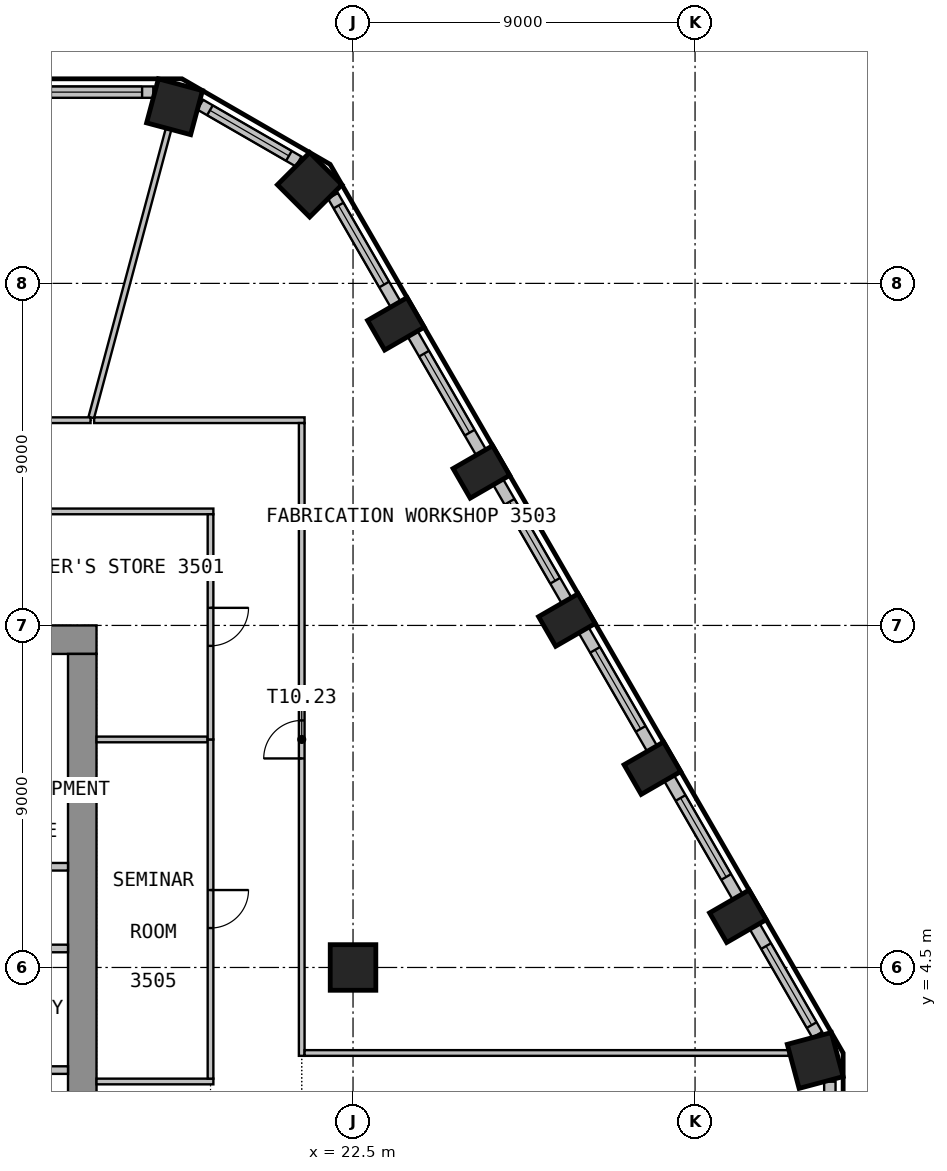
"""IFC4 building model, lengths in metres.
Left out: names, types, materials, properties, quantities, classifications, styles, units other than length and angle.
Written with IfcOpenShell. Run it as: python <this file> out.ifc"""

import sys

from ifc_helpers import new_model, si_unit, direction, frame, frame_2d, origin, origin_2d, place, context, subcontext, project, spatial, rectangle, circle, extrude, element, fill, save


model = new_model("IFC4")
c1 = context("Model", 3, precision=1e-05, world=origin(), true_north=direction((0.0, 1.0)))
c2 = subcontext(c1, "Body", "Model", "MODEL_VIEW")
j1 = project(units=[si_unit("LENGTHUNIT", "METRE"), si_unit("PLANEANGLEUNIT", "RADIAN")], contexts=[c1])
p1 = place(None, origin())
s1 = spatial("IfcSite", under=j1, at=p1, CompositionType="ELEMENT")
p2 = place(p1, origin())
s2 = spatial("IfcBuilding", under=s1, at=p2, CompositionType="ELEMENT")
p3 = place(p2, frame((0.0, 0.0, 144.3)))
s3 = spatial("IfcBuildingStorey", under=s2, at=p3, CompositionType="ELEMENT", Elevation=144.3)
p4 = place(p3, frame((34.662, 2.053, 0.0), z_axis=(0.0, 0.0, 1.0), x_axis=(-0.258819045103, 0.965925826289, 0.0)))
e1 = element("IfcColumn", 1, at=p4, inside=s3, PredefinedType="COLUMN", context=c2, shape_type="SweptSolid", body=[
    extrude(rectangle(XDim=1.2, YDim=1.2, at=origin_2d()), origin(), (0.0, 0.0, 1.0), 3.575),
])
for number, where, z_axis, x_axis in (
    (2, (32.627, 5.847, 0.0), (0.0, 0.0, 1.0), (-0.5, 0.866, 0.0)),
    (3, (30.377, 9.744, 0.0), (0.0, 0.0, 1.0), (-0.5, 0.866, 0.0)),
    (4, (28.127, 13.641, 0.0), (0.0, 0.0, 1.0), (-0.5, 0.866, 0.0)),
    (5, (25.877, 17.539, 0.0), (0.0, 0.0, 1.0), (-0.5, 0.866, 0.0)),
    (6, (23.627, 21.436, 0.0), (0.0, 0.0, 1.0), (-0.5, 0.866, 0.0)),
):
    element("IfcColumn", number, at=place(p3, frame(where, z_axis=z_axis, x_axis=x_axis)), inside=s3, PredefinedType="COLUMN", context=c2, shape_type="SweptSolid", body=[
        extrude(rectangle(XDim=0.9, YDim=1.2, at=origin_2d()), origin(), (0.0, 0.0, 1.0), 3.575),
    ])
for number, where, z_axis, x_axis in (
    (7, (21.359, 25.095, 0.0), (0.0, 0.0, 1.0), (-0.707, 0.707, 0.0)),
    (8, (17.803, 27.148, 0.0), (0.0, 0.0, 1.0), (-0.966, 0.259, 0.0)),
):
    element("IfcColumn", number, at=place(p3, frame(where, z_axis=z_axis, x_axis=x_axis)), inside=s3, PredefinedType="COLUMN", context=c2, shape_type="SweptSolid", body=[
        extrude(rectangle(XDim=1.2, YDim=1.2, at=origin_2d()), origin(), (0.0, 0.0, 1.0), 3.575),
    ])
p5 = place(p3, frame((22.5, 4.5, 0.0), z_axis=(0.0, 0.0, 1.0), x_axis=(1.0, 0.0, 0.0)))
e9 = element("IfcColumn", 9, at=p5, inside=s3, PredefinedType="COLUMN", context=c2, shape_type="SweptSolid", body=[
    extrude(circle(Radius=0.6, at=origin_2d()), origin(), (0.0, 0.0, 1.0), 3.575),
])
p6 = place(p3, frame((35.047, -1.495, 0.0), z_axis=(0.0, 0.0, 1.0), x_axis=(0.0, 1.0, 0.0)))
e10 = element("IfcWall", 10, at=p6, inside=s3, PredefinedType="SOLIDWALL", context=c2, shape_type="SweptSolid", body=[
    extrude(rectangle(XDim=2.989, YDim=0.3, at=frame_2d((1.495, 0.0))), origin(), (0.0, 0.0, 1.0), 3.575),
])
p7 = place(p6, frame((0.295, 0.0, 0.9)))
e11 = element("IfcOpeningElement", 11, at=p7, cuts=e10, PredefinedType="OPENING", context=c2, shape_type="SweptSolid", body=[
    extrude(rectangle(XDim=2.4, YDim=2.1, at=frame_2d((1.2, 1.05))), frame((0.0, 0.16, 0.0), z_axis=(0.0, -1.0, 0.0), x_axis=(1.0, 0.0, 0.0)), (0.0, 0.0, 1.0), 0.32),
])
p8 = place(p3, frame((34.716, 2.729, 0.0), z_axis=(0.0, 0.0, 1.0), x_axis=(-0.499981217486, 0.866036247602, 0.0)))
e12 = element("IfcWall", 12, at=p8, inside=s3, PredefinedType="SOLIDWALL", context=c2, shape_type="SweptSolid", body=[
    extrude(rectangle(XDim=3.294, YDim=0.3, at=frame_2d((1.647, 0.0))), origin(), (0.0, 0.0, 1.0), 3.575),
])
p9 = place(p8, frame((0.295, 0.0, 0.9)))
e13 = element("IfcOpeningElement", 13, at=p9, cuts=e12, PredefinedType="OPENING", context=c2, shape_type="SweptSolid", body=[
    extrude(rectangle(XDim=2.4, YDim=2.1, at=frame_2d((1.2, 1.05))), frame((0.0, 0.16, 0.0), z_axis=(0.0, -1.0, 0.0), x_axis=(1.0, 0.0, 0.0)), (0.0, 0.0, 1.0), 0.32),
])
p10 = place(p3, frame((32.619, 6.362, 0.0), z_axis=(0.0, 0.0, 1.0), x_axis=(-0.500027802648, 0.866009351323, 0.0)))
e14 = element("IfcWall", 14, at=p10, inside=s3, PredefinedType="SOLIDWALL", context=c2, shape_type="SweptSolid", body=[
    extrude(rectangle(XDim=3.599, YDim=0.3, at=frame_2d((1.799, 0.0))), origin(), (0.0, 0.0, 1.0), 3.575),
])
p11 = place(p10, frame((0.6, 0.0, 0.9)))
e15 = element("IfcOpeningElement", 15, at=p11, cuts=e14, PredefinedType="OPENING", context=c2, shape_type="SweptSolid", body=[
    extrude(rectangle(XDim=2.4, YDim=2.1, at=frame_2d((1.2, 1.05))), frame((0.0, 0.16, 0.0), z_axis=(0.0, -1.0, 0.0), x_axis=(1.0, 0.0, 0.0)), (0.0, 0.0, 1.0), 0.32),
])
p12 = place(p3, frame((30.369, 10.26, 0.0), z_axis=(0.0, 0.0, 1.0), x_axis=(-0.500027802648, 0.866009351323, 0.0)))
e16 = element("IfcWall", 16, at=p12, inside=s3, PredefinedType="SOLIDWALL", context=c2, shape_type="SweptSolid", body=[
    extrude(rectangle(XDim=3.599, YDim=0.3, at=frame_2d((1.799, 0.0))), origin(), (0.0, 0.0, 1.0), 3.575),
])
p13 = place(p12, frame((0.6, 0.0, 0.9)))
e17 = element("IfcOpeningElement", 17, at=p13, cuts=e16, PredefinedType="OPENING", context=c2, shape_type="SweptSolid", body=[
    extrude(rectangle(XDim=2.4, YDim=2.1, at=frame_2d((1.2, 1.05))), frame((0.0, 0.16, 0.0), z_axis=(0.0, -1.0, 0.0), x_axis=(1.0, 0.0, 0.0)), (0.0, 0.0, 1.0), 0.32),
])
p14 = place(p3, frame((28.119, 14.156, 0.0), z_axis=(0.0, 0.0, 1.0), x_axis=(-0.500027802648, 0.866009351323, 0.0)))
e18 = element("IfcWall", 18, at=p14, inside=s3, PredefinedType="SOLIDWALL", context=c2, shape_type="SweptSolid", body=[
    extrude(rectangle(XDim=3.599, YDim=0.3, at=frame_2d((1.799, 0.0))), origin(), (0.0, 0.0, 1.0), 3.575),
])
p15 = place(p14, frame((0.6, 0.0, 0.9)))
e19 = element("IfcOpeningElement", 19, at=p15, cuts=e18, PredefinedType="OPENING", context=c2, shape_type="SweptSolid", body=[
    extrude(rectangle(XDim=2.4, YDim=2.1, at=frame_2d((1.2, 1.05))), frame((0.0, 0.16, 0.0), z_axis=(0.0, -1.0, 0.0), x_axis=(1.0, 0.0, 0.0)), (0.0, 0.0, 1.0), 0.32),
])
p16 = place(p3, frame((25.869, 18.054, 0.0), z_axis=(0.0, 0.0, 1.0), x_axis=(-0.500027802648, 0.866009351323, 0.0)))
e20 = element("IfcWall", 20, at=p16, inside=s3, PredefinedType="SOLIDWALL", context=c2, shape_type="SweptSolid", body=[
    extrude(rectangle(XDim=3.599, YDim=0.3, at=frame_2d((1.799, 0.0))), origin(), (0.0, 0.0, 1.0), 3.575),
])
p17 = place(p16, frame((0.6, 0.0, 0.9)))
e21 = element("IfcOpeningElement", 21, at=p17, cuts=e20, PredefinedType="OPENING", context=c2, shape_type="SweptSolid", body=[
    extrude(rectangle(XDim=2.4, YDim=2.1, at=frame_2d((1.2, 1.05))), frame((0.0, 0.16, 0.0), z_axis=(0.0, -1.0, 0.0), x_axis=(1.0, 0.0, 0.0)), (0.0, 0.0, 1.0), 0.32),
])
p18 = place(p3, frame((23.619, 21.951, 0.0), z_axis=(0.0, 0.0, 1.0), x_axis=(-0.500036802197, 0.866004154983, 0.0)))
e22 = element("IfcWall", 22, at=p18, inside=s3, PredefinedType="SOLIDWALL", context=c2, shape_type="SweptSolid", body=[
    extrude(rectangle(XDim=3.294, YDim=0.3, at=frame_2d((1.647, 0.0))), origin(), (0.0, 0.0, 1.0), 3.575),
])
p19 = place(p18, frame((0.6, 0.0, 0.9)))
e23 = element("IfcOpeningElement", 23, at=p19, cuts=e22, PredefinedType="OPENING", context=c2, shape_type="SweptSolid", body=[
    extrude(rectangle(XDim=2.4, YDim=2.1, at=frame_2d((1.2, 1.05))), frame((0.0, 0.16, 0.0), z_axis=(0.0, -1.0, 0.0), x_axis=(1.0, 0.0, 0.0)), (0.0, 0.0, 1.0), 0.32),
])
p20 = place(p3, frame((21.068, 25.707, 0.0), z_axis=(0.0, 0.0, 1.0), x_axis=(-0.866012844897, 0.500021752, 0.0)))
e24 = element("IfcWall", 24, at=p20, inside=s3, PredefinedType="SOLIDWALL", context=c2, shape_type="SweptSolid", body=[
    extrude(rectangle(XDim=2.989, YDim=0.3, at=frame_2d((1.495, 0.0))), origin(), (0.0, 0.0, 1.0), 3.575),
])
p21 = place(p20, frame((0.295, 0.0, 0.9)))
e25 = element("IfcOpeningElement", 25, at=p21, cuts=e24, PredefinedType="OPENING", context=c2, shape_type="SweptSolid", body=[
    extrude(rectangle(XDim=2.4, YDim=2.1, at=frame_2d((1.2, 1.05))), frame((0.0, 0.16, 0.0), z_axis=(0.0, -1.0, 0.0), x_axis=(1.0, 0.0, 0.0)), (0.0, 0.0, 1.0), 0.32),
])
p22 = place(p3, frame((17.245, 27.533, 0.0), z_axis=(0.0, 0.0, 1.0), x_axis=(-1.0, 0.0, 0.0)))
e26 = element("IfcWall", 26, at=p22, inside=s3, PredefinedType="SOLIDWALL", context=c2, shape_type="SweptSolid", body=[
    extrude(rectangle(XDim=3.294, YDim=0.3, at=frame_2d((1.647, 0.0))), origin(), (0.0, 0.0, 1.0), 3.575),
])
p23 = place(p22, frame((0.295, 0.0, 0.9)))
e27 = element("IfcOpeningElement", 27, at=p23, cuts=e26, PredefinedType="OPENING", context=c2, shape_type="SweptSolid", body=[
    extrude(rectangle(XDim=2.4, YDim=2.1, at=frame_2d((1.2, 1.05))), frame((0.0, 0.16, 0.0), z_axis=(0.0, -1.0, 0.0), x_axis=(1.0, 0.0, 0.0)), (0.0, 0.0, 1.0), 0.32),
])
p24 = place(p3, frame((-15.75, 13.125, 0.0), z_axis=(0.0, 0.0, 1.0), x_axis=(1.0, 0.0, 0.0)))
e28 = element("IfcWall", 28, at=p24, inside=s3, PredefinedType="SHEAR", context=c2, shape_type="SweptSolid", body=[
    extrude(rectangle(XDim=31.5, YDim=0.75, at=frame_2d((15.75, 0.0))), origin(), (0.0, 0.0, 1.0), 3.575),
])
p25 = place(p24, frame((14.55, 0.0, 0.0)))
e29 = element("IfcOpeningElement", 29, at=p25, cuts=e28, PredefinedType="OPENING", context=c2, shape_type="SweptSolid", body=[
    extrude(rectangle(XDim=2.4, YDim=2.1, at=frame_2d((1.2, 1.05))), frame((0.0, 0.385, 0.0), z_axis=(0.0, -1.0, 0.0), x_axis=(1.0, 0.0, 0.0)), (0.0, 0.0, 1.0), 0.77),
])
p26 = place(p24, frame((3.3, 0.0, 0.0)))
e30 = element("IfcOpeningElement", 30, at=p26, cuts=e28, PredefinedType="OPENING", context=c2, shape_type="SweptSolid", body=[
    extrude(rectangle(XDim=1.2, YDim=2.1, at=frame_2d((0.6, 1.05))), frame((0.0, 0.385, 0.0), z_axis=(0.0, -1.0, 0.0), x_axis=(1.0, 0.0, 0.0)), (0.0, 0.0, 1.0), 0.77),
])
p27 = place(p24, frame((27.0, 0.0, 0.0)))
e31 = element("IfcOpeningElement", 31, at=p27, cuts=e28, PredefinedType="OPENING", context=c2, shape_type="SweptSolid", body=[
    extrude(rectangle(XDim=1.2, YDim=2.1, at=frame_2d((0.6, 1.05))), frame((0.0, 0.385, 0.0), z_axis=(0.0, -1.0, 0.0), x_axis=(1.0, 0.0, 0.0)), (0.0, 0.0, 1.0), 0.77),
])
p28 = place(p3, frame((15.375, -12.75, 0.0), z_axis=(0.0, 0.0, 1.0), x_axis=(0.0, 1.0, 0.0)))
e32 = element("IfcWall", 32, at=p28, inside=s3, PredefinedType="SHEAR", context=c2, shape_type="SweptSolid", body=[
    extrude(rectangle(XDim=25.5, YDim=0.75, at=frame_2d((12.75, 0.0))), origin(), (0.0, 0.0, 1.0), 3.575),
])
p29 = place(p28, frame((11.55, 0.0, 0.0)))
e33 = element("IfcOpeningElement", 33, at=p29, cuts=e32, PredefinedType="OPENING", context=c2, shape_type="SweptSolid", body=[
    extrude(rectangle(XDim=2.4, YDim=2.1, at=frame_2d((1.2, 1.05))), frame((0.0, 0.385, 0.0), z_axis=(0.0, -1.0, 0.0), x_axis=(1.0, 0.0, 0.0)), (0.0, 0.0, 1.0), 0.77),
])
p30 = place(p3, frame((12.9, 7.15, 0.0), z_axis=(0.0, 0.0, 1.0), x_axis=(1.0, 0.0, 0.0)))
e34 = element("IfcWall", 34, at=p30, inside=s3, PredefinedType="PARTITIONING", context=c2, shape_type="SweptSolid", body=[
    extrude(rectangle(XDim=2.1, YDim=0.2, at=frame_2d((1.05, 0.0))), origin(), (0.0, 0.0, 1.0), 3.575),
])
p31 = place(p30, frame((0.6, 0.0, 0.0)))
e35 = element("IfcOpeningElement", 35, at=p31, cuts=e34, PredefinedType="OPENING", context=c2, shape_type="SweptSolid", body=[
    extrude(rectangle(XDim=0.9, YDim=2.1, at=frame_2d((0.45, 1.05))), frame((0.0, 0.11, 0.0), z_axis=(0.0, -1.0, 0.0), x_axis=(1.0, 0.0, 0.0)), (0.0, 0.0, 1.0), 0.22),
])
p32 = place(p3, frame((12.9, 5.0, 0.0), z_axis=(0.0, 0.0, 1.0), x_axis=(1.0, 0.0, 0.0)))
e36 = element("IfcWall", 36, at=p32, inside=s3, PredefinedType="PARTITIONING", context=c2, shape_type="SweptSolid", body=[
    extrude(rectangle(XDim=2.1, YDim=0.2, at=frame_2d((1.05, 0.0))), origin(), (0.0, 0.0, 1.0), 3.575),
])
p33 = place(p32, frame((0.6, 0.0, 0.0)))
e37 = element("IfcOpeningElement", 37, at=p33, cuts=e36, PredefinedType="OPENING", context=c2, shape_type="SweptSolid", body=[
    extrude(rectangle(XDim=0.9, YDim=2.1, at=frame_2d((0.45, 1.05))), frame((0.0, 0.11, 0.0), z_axis=(0.0, -1.0, 0.0), x_axis=(1.0, 0.0, 0.0)), (0.0, 0.0, 1.0), 0.22),
])
p34 = place(p3, frame((12.9, 1.8, 0.0), z_axis=(0.0, 0.0, 1.0), x_axis=(1.0, 0.0, 0.0)))
e38 = element("IfcWall", 38, at=p34, inside=s3, PredefinedType="PARTITIONING", context=c2, shape_type="SweptSolid", body=[
    extrude(rectangle(XDim=2.1, YDim=0.2, at=frame_2d((1.05, 0.0))), origin(), (0.0, 0.0, 1.0), 3.575),
])
p35 = place(p3, frame((15.593, 18.9, 0.0), z_axis=(0.0, 0.0, 1.0), x_axis=(-1.0, 0.0, 0.0)))
e39 = element("IfcWall", 39, at=p35, inside=s3, PredefinedType="PARTITIONING", context=c2, shape_type="SweptSolid", body=[
    extrude(rectangle(XDim=15.593, YDim=0.15, at=frame_2d((7.796, 0.0))), origin(), (0.0, 0.0, 1.0), 3.575),
])
p36 = place(p35, frame((7.296, 0.0, 0.0)))
e40 = element("IfcOpeningElement", 40, at=p36, cuts=e39, PredefinedType="OPENING", context=c2, shape_type="SweptSolid", body=[
    extrude(rectangle(XDim=1.0, YDim=2.1, at=frame_2d((0.5, 1.05))), frame((0.0, 0.085, 0.0), z_axis=(0.0, -1.0, 0.0), x_axis=(1.0, 0.0, 0.0)), (0.0, 0.0, 1.0), 0.17),
])
p37 = place(p3, frame((13.425, 16.5, 0.0), z_axis=(0.0, 0.0, 1.0), x_axis=(1.0, 0.0, 0.0)))
e41 = element("IfcWall", 41, at=p37, inside=s3, PredefinedType="PARTITIONING", context=c2, shape_type="SweptSolid", body=[
    extrude(rectangle(XDim=5.4, YDim=0.15, at=frame_2d((2.7, 0.0))), origin(), (0.0, 0.0, 1.0), 3.575),
])
p38 = place(p3, frame((17.643, 26.549, 0.0), z_axis=(0.0, 0.0, 1.0), x_axis=(-0.258869363255, -0.965912342176, 0.0)))
e42 = element("IfcWall", 42, at=p38, inside=s3, PredefinedType="PARTITIONING", context=c2, shape_type="SweptSolid", body=[
    extrude(rectangle(XDim=7.844, YDim=0.15, at=frame_2d((3.922, 0.0))), origin(), (0.0, 0.0, 1.0), 3.575),
])
p39 = place(p3, frame((21.225, 18.9, 0.0), z_axis=(0.0, 0.0, 1.0), x_axis=(-1.0, 0.0, 0.0)))
e43 = element("IfcWall", 43, at=p39, inside=s3, PredefinedType="PARTITIONING", context=c2, shape_type="SweptSolid", body=[
    extrude(rectangle(XDim=5.537, YDim=0.15, at=frame_2d((2.769, 0.0))), origin(), (0.0, 0.0, 1.0), 3.575),
])
p40 = place(p3, frame((18.825, 1.5, 0.0), z_axis=(0.0, 0.0, 1.0), x_axis=(-1.0, 0.0, 0.0)))
e44 = element("IfcWall", 44, at=p40, inside=s3, PredefinedType="PARTITIONING", context=c2, shape_type="SweptSolid", body=[
    extrude(rectangle(XDim=3.075, YDim=0.15, at=frame_2d((1.538, 0.0))), origin(), (0.0, 0.0, 1.0), 3.575),
])
p41 = place(p3, frame((18.675, 10.5, 0.0), z_axis=(0.0, 0.0, 1.0), x_axis=(-1.0, 0.0, 0.0)))
e45 = element("IfcWall", 45, at=p41, inside=s3, PredefinedType="PARTITIONING", context=c2, shape_type="SweptSolid", body=[
    extrude(rectangle(XDim=2.925, YDim=0.15, at=frame_2d((1.462, 0.0))), origin(), (0.0, 0.0, 1.0), 3.575),
])
p42 = place(p3, frame((18.75, 10.5, 0.0), z_axis=(0.0, 0.0, 1.0), x_axis=(0.0, -1.0, 0.0)))
e46 = element("IfcWall", 46, at=p42, inside=s3, PredefinedType="PARTITIONING", context=c2, shape_type="SweptSolid", body=[
    extrude(rectangle(XDim=8.925, YDim=0.15, at=frame_2d((4.462, 0.0))), origin(), (0.0, 0.0, 1.0), 3.575),
])
p43 = place(p42, frame((3.962, 0.0, 0.0)))
e47 = element("IfcOpeningElement", 47, at=p43, cuts=e46, PredefinedType="OPENING", context=c2, shape_type="SweptSolid", body=[
    extrude(rectangle(XDim=1.0, YDim=2.1, at=frame_2d((0.5, 1.05))), frame((0.0, 0.085, 0.0), z_axis=(0.0, -1.0, 0.0), x_axis=(1.0, 0.0, 0.0)), (0.0, 0.0, 1.0), 0.17),
])
p44 = place(p3, frame((18.75, 16.425, 0.0), z_axis=(0.0, 0.0, 1.0), x_axis=(0.0, -1.0, 0.0)))
e48 = element("IfcWall", 48, at=p44, inside=s3, PredefinedType="PARTITIONING", context=c2, shape_type="SweptSolid", body=[
    extrude(rectangle(XDim=5.925, YDim=0.15, at=frame_2d((2.962, 0.0))), origin(), (0.0, 0.0, 1.0), 3.575),
])
p45 = place(p44, frame((2.462, 0.0, 0.0)))
e49 = element("IfcOpeningElement", 49, at=p45, cuts=e48, PredefinedType="OPENING", context=c2, shape_type="SweptSolid", body=[
    extrude(rectangle(XDim=1.0, YDim=2.1, at=frame_2d((0.5, 1.05))), frame((0.0, 0.085, 0.0), z_axis=(0.0, -1.0, 0.0), x_axis=(1.0, 0.0, 0.0)), (0.0, 0.0, 1.0), 0.17),
])
p46 = place(p3, frame((21.15, 2.175, 0.0), z_axis=(0.0, 0.0, 1.0), x_axis=(0.0, 1.0, 0.0)))
e50 = element("IfcWall", 50, at=p46, inside=s3, PredefinedType="PARTITIONING", context=c2, shape_type="SweptSolid", body=[
    extrude(rectangle(XDim=16.65, YDim=0.15, at=frame_2d((8.325, 0.0))), origin(), (0.0, 0.0, 1.0), 3.575),
])
p47 = place(p46, frame((7.825, 0.0, 0.0)))
e51 = element("IfcOpeningElement", 51, at=p47, cuts=e50, PredefinedType="OPENING", context=c2, shape_type="SweptSolid", body=[
    extrude(rectangle(XDim=1.0, YDim=2.1, at=frame_2d((0.5, 1.05))), frame((0.0, 0.085, 0.0), z_axis=(0.0, -1.0, 0.0), x_axis=(1.0, 0.0, 0.0)), (0.0, 0.0, 1.0), 0.17),
])
p48 = place(p3, frame((21.225, 2.25, 0.0), z_axis=(0.0, 0.0, 1.0), x_axis=(1.0, 0.0, 0.0)))
e52 = element("IfcWall", 52, at=p48, inside=s3, PredefinedType="PARTITIONING", context=c2, shape_type="SweptSolid", body=[
    extrude(rectangle(XDim=12.743, YDim=0.15, at=frame_2d((6.371, 0.0))), origin(), (0.0, 0.0, 1.0), 3.575),
])
p49 = place(p9, origin())
e53 = element("IfcWindow", 53, at=p49, inside=s3, PartitioningType="SINGLE_PANEL", PredefinedType="WINDOW", context=c2, shape_type="SweptSolid", body=[
    extrude(rectangle(XDim=2.4, YDim=2.1, at=frame_2d((1.2, 1.05))), frame((0.0, 0.03, 0.0), z_axis=(0.0, -1.0, 0.0), x_axis=(1.0, 0.0, 0.0)), (0.0, 0.0, 1.0), 0.06),
])
fill(e13, e53)
p50 = place(p11, origin())
e54 = element("IfcWindow", 54, at=p50, inside=s3, PartitioningType="SINGLE_PANEL", PredefinedType="WINDOW", context=c2, shape_type="SweptSolid", body=[
    extrude(rectangle(XDim=2.4, YDim=2.1, at=frame_2d((1.2, 1.05))), frame((0.0, 0.03, 0.0), z_axis=(0.0, -1.0, 0.0), x_axis=(1.0, 0.0, 0.0)), (0.0, 0.0, 1.0), 0.06),
])
fill(e15, e54)
p51 = place(p13, origin())
e55 = element("IfcWindow", 55, at=p51, inside=s3, PartitioningType="SINGLE_PANEL", PredefinedType="WINDOW", context=c2, shape_type="SweptSolid", body=[
    extrude(rectangle(XDim=2.4, YDim=2.1, at=frame_2d((1.2, 1.05))), frame((0.0, 0.03, 0.0), z_axis=(0.0, -1.0, 0.0), x_axis=(1.0, 0.0, 0.0)), (0.0, 0.0, 1.0), 0.06),
])
fill(e17, e55)
p52 = place(p15, origin())
e56 = element("IfcWindow", 56, at=p52, inside=s3, PartitioningType="SINGLE_PANEL", PredefinedType="WINDOW", context=c2, shape_type="SweptSolid", body=[
    extrude(rectangle(XDim=2.4, YDim=2.1, at=frame_2d((1.2, 1.05))), frame((0.0, 0.03, 0.0), z_axis=(0.0, -1.0, 0.0), x_axis=(1.0, 0.0, 0.0)), (0.0, 0.0, 1.0), 0.06),
])
fill(e19, e56)
p53 = place(p17, origin())
e57 = element("IfcWindow", 57, at=p53, inside=s3, PartitioningType="SINGLE_PANEL", PredefinedType="WINDOW", context=c2, shape_type="SweptSolid", body=[
    extrude(rectangle(XDim=2.4, YDim=2.1, at=frame_2d((1.2, 1.05))), frame((0.0, 0.03, 0.0), z_axis=(0.0, -1.0, 0.0), x_axis=(1.0, 0.0, 0.0)), (0.0, 0.0, 1.0), 0.06),
])
fill(e21, e57)
p54 = place(p19, origin())
e58 = element("IfcWindow", 58, at=p54, inside=s3, PartitioningType="SINGLE_PANEL", PredefinedType="WINDOW", context=c2, shape_type="SweptSolid", body=[
    extrude(rectangle(XDim=2.4, YDim=2.1, at=frame_2d((1.2, 1.05))), frame((0.0, 0.03, 0.0), z_axis=(0.0, -1.0, 0.0), x_axis=(1.0, 0.0, 0.0)), (0.0, 0.0, 1.0), 0.06),
])
fill(e23, e58)
p55 = place(p21, origin())
e59 = element("IfcWindow", 59, at=p55, inside=s3, PartitioningType="SINGLE_PANEL", PredefinedType="WINDOW", context=c2, shape_type="SweptSolid", body=[
    extrude(rectangle(XDim=2.4, YDim=2.1, at=frame_2d((1.2, 1.05))), frame((0.0, 0.03, 0.0), z_axis=(0.0, -1.0, 0.0), x_axis=(1.0, 0.0, 0.0)), (0.0, 0.0, 1.0), 0.06),
])
fill(e25, e59)
p56 = place(p23, origin())
e60 = element("IfcWindow", 60, at=p56, inside=s3, PartitioningType="SINGLE_PANEL", PredefinedType="WINDOW", context=c2, shape_type="SweptSolid", body=[
    extrude(rectangle(XDim=2.4, YDim=2.1, at=frame_2d((1.2, 1.05))), frame((0.0, 0.03, 0.0), z_axis=(0.0, -1.0, 0.0), x_axis=(1.0, 0.0, 0.0)), (0.0, 0.0, 1.0), 0.06),
])
fill(e27, e60)
p57 = place(p45, origin())
e61 = element("IfcDoor", 61, at=p57, inside=s3, OperationType="SINGLE_SWING_RIGHT", PredefinedType="DOOR", context=c2, shape_type="SweptSolid", body=[
    extrude(rectangle(XDim=1.0, YDim=2.1, at=frame_2d((0.5, 1.05))), frame((0.0, 0.025, 0.0), z_axis=(0.0, -1.0, 0.0), x_axis=(1.0, 0.0, 0.0)), (0.0, 0.0, 1.0), 0.05),
])
fill(e49, e61)
p58 = place(p43, origin())
e62 = element("IfcDoor", 62, at=p58, inside=s3, OperationType="SINGLE_SWING_RIGHT", PredefinedType="DOOR", context=c2, shape_type="SweptSolid", body=[
    extrude(rectangle(XDim=1.0, YDim=2.1, at=frame_2d((0.5, 1.05))), frame((0.0, 0.025, 0.0), z_axis=(0.0, -1.0, 0.0), x_axis=(1.0, 0.0, 0.0)), (0.0, 0.0, 1.0), 0.05),
])
fill(e47, e62)
p59 = place(p47, origin())
e63 = element("IfcDoor", 63, at=p59, inside=s3, OperationType="SINGLE_SWING_RIGHT", PredefinedType="DOOR", context=c2, shape_type="SweptSolid", body=[
    extrude(rectangle(XDim=1.0, YDim=2.1, at=frame_2d((0.5, 1.05))), frame((0.0, 0.025, 0.0), z_axis=(0.0, -1.0, 0.0), x_axis=(1.0, 0.0, 0.0)), (0.0, 0.0, 1.0), 0.05),
])
fill(e51, e63)
save(model, sys.argv[1])
